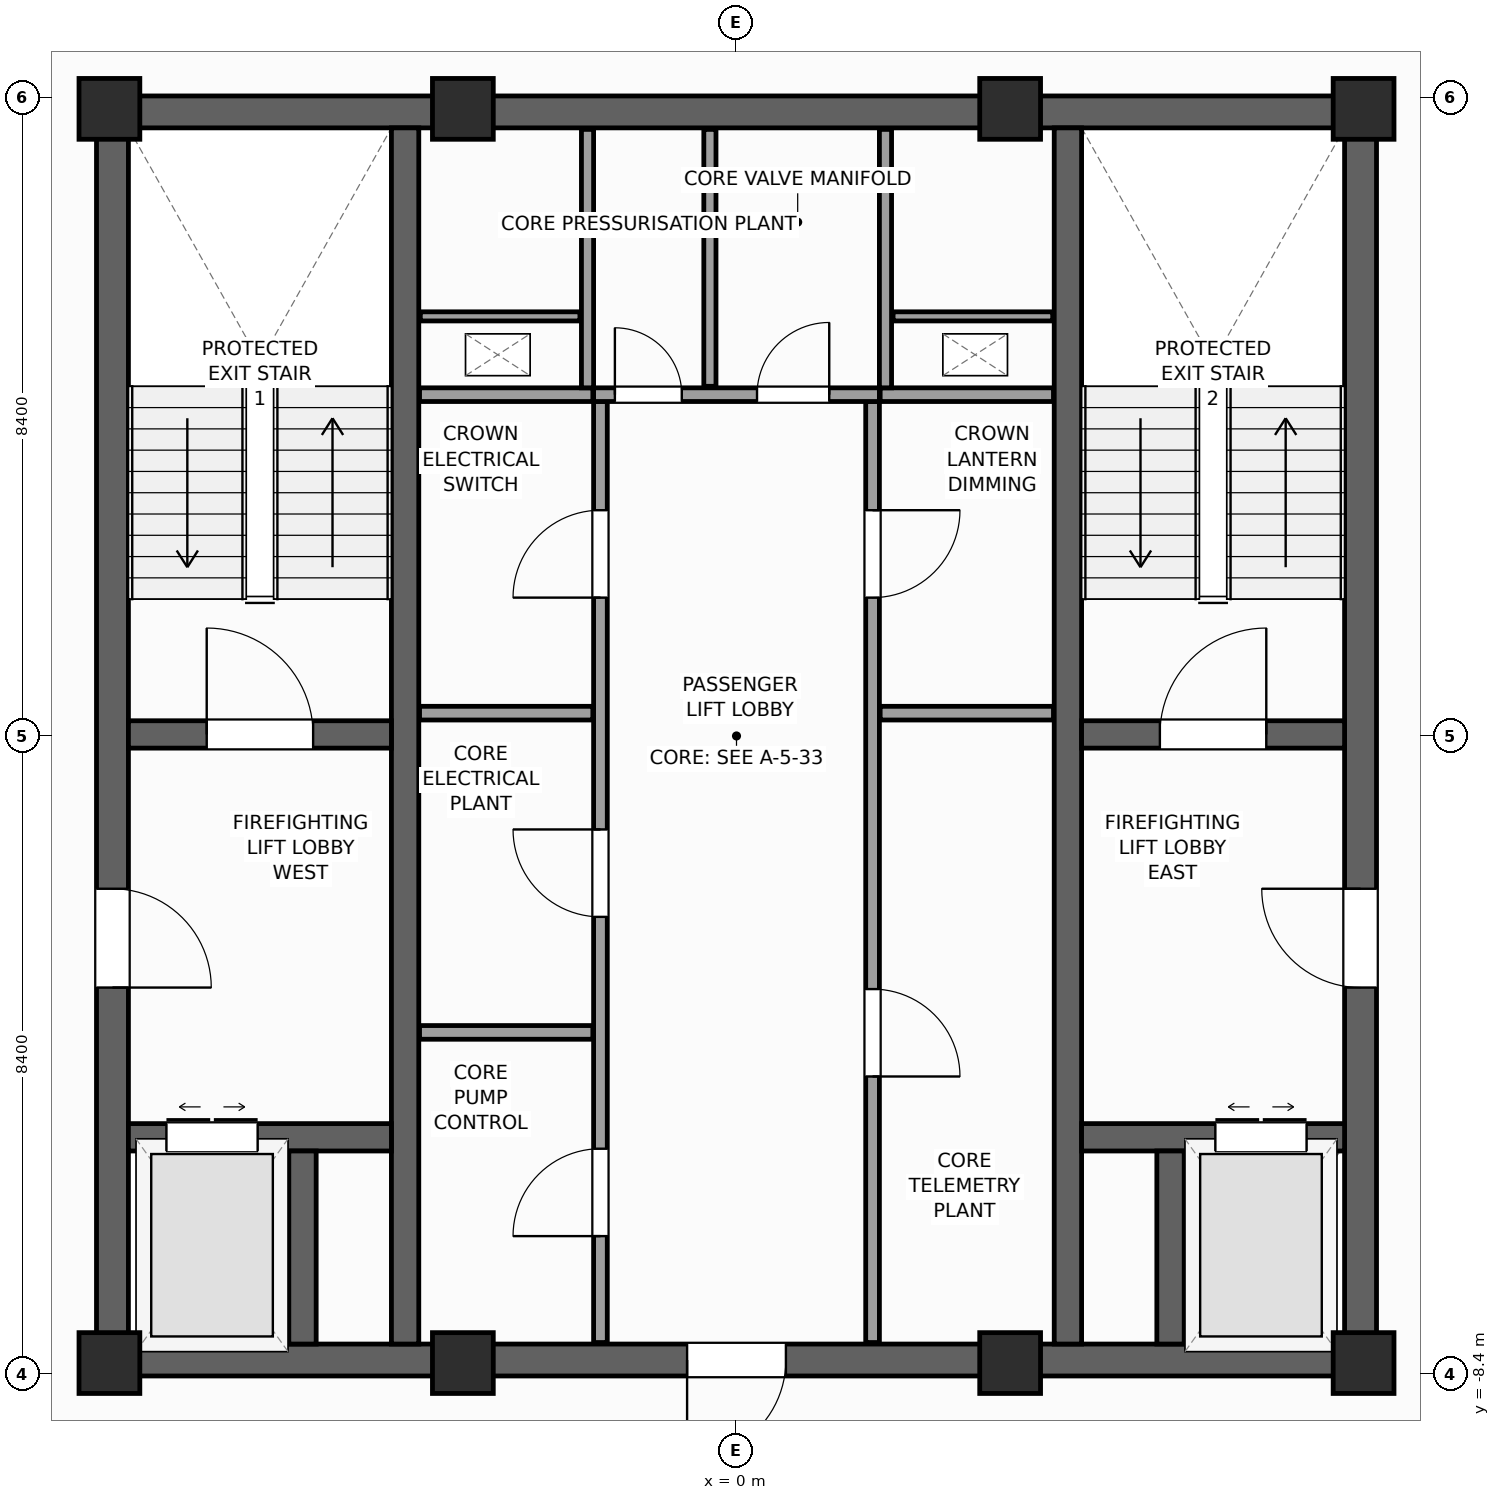
"""IFC4 building model, lengths in metres.
Left out: names, types, materials, properties, quantities, classifications, styles, units other than length and angle.
Written with IfcOpenShell. Run it as: python <this file> out.ifc"""

import sys

from ifc_helpers import new_model, si_unit, direction, frame, frame_2d, origin, origin_2d, place, context, subcontext, project, spatial, rectangle, extrude, source, transform, mapped, element, fill, save


model = new_model("IFC4")
c1 = context("Model", 3, precision=1e-05, world=origin(), true_north=direction((0.0, 1.0)))
c2 = subcontext(c1, "Body", "Model", "MODEL_VIEW")
j1 = project(units=[si_unit("LENGTHUNIT", "METRE"), si_unit("PLANEANGLEUNIT", "RADIAN")], contexts=[c1])
p1 = place(None, origin())
s1 = spatial("IfcSite", under=j1, at=p1, CompositionType="ELEMENT")
p2 = place(p1, origin())
s2 = spatial("IfcBuilding", under=s1, at=p2, CompositionType="ELEMENT")
p3 = place(p2, frame((0.0, 0.0, 337.6)))
s3 = spatial("IfcBuildingStorey", under=s2, at=p3, CompositionType="ELEMENT", Elevation=337.6)
p4 = place(p3, frame((-8.42, -8.21, 0.0), z_axis=(0.0, 0.0, 1.0), x_axis=(1.0, 0.0, 0.0)))
e1 = element("IfcWall", 1, at=p4, inside=s3, PredefinedType="SHEAR", context=c2, shape_type="SweptSolid", body=[
    extrude(rectangle(XDim=16.84, YDim=0.42, at=frame_2d((8.42, 0.0))), origin(), (0.0, 0.0, 1.0), 4.0),
])
p5 = place(p4, frame((7.77, 0.0, 0.0)))
e2 = element("IfcOpeningElement", 2, at=p5, cuts=e1, PredefinedType="OPENING", context=c2, shape_type="SweptSolid", body=[
    extrude(rectangle(XDim=1.3, YDim=2.2, at=frame_2d((0.65, 1.1))), frame((0.0, 0.22, 0.0), z_axis=(0.0, -1.0, 0.0), x_axis=(1.0, 0.0, 0.0)), (0.0, 0.0, 1.0), 0.44),
])
p6 = place(p3, frame((-8.42, 8.21, 0.0), z_axis=(0.0, 0.0, 1.0), x_axis=(1.0, 0.0, 0.0)))
e3 = element("IfcWall", 3, at=p6, inside=s3, PredefinedType="SHEAR", context=c2, shape_type="SweptSolid", body=[
    extrude(rectangle(XDim=16.84, YDim=0.42, at=frame_2d((8.42, 0.0))), origin(), (0.0, 0.0, 1.0), 4.0),
])
p7 = place(p3, frame((-8.21, -8.0, 0.0), z_axis=(0.0, 0.0, 1.0), x_axis=(0.0, 1.0, 0.0)))
e4 = element("IfcWall", 4, at=p7, inside=s3, PredefinedType="SHEAR", context=c2, shape_type="SweptSolid", body=[
    extrude(rectangle(XDim=16.0, YDim=0.42, at=frame_2d((8.0, 0.0))), origin(), (0.0, 0.0, 1.0), 4.0),
])
p8 = place(p7, frame((4.69, 0.0, 0.0)))
e5 = element("IfcOpeningElement", 5, at=p8, cuts=e4, PredefinedType="OPENING", context=c2, shape_type="SweptSolid", body=[
    extrude(rectangle(XDim=1.3, YDim=2.2, at=frame_2d((0.65, 1.1))), frame((0.0, 0.22, 0.0), z_axis=(0.0, -1.0, 0.0), x_axis=(1.0, 0.0, 0.0)), (0.0, 0.0, 1.0), 0.44),
])
p9 = place(p3, frame((8.21, -8.0, 0.0), z_axis=(0.0, 0.0, 1.0), x_axis=(0.0, 1.0, 0.0)))
e6 = element("IfcWall", 6, at=p9, inside=s3, PredefinedType="SHEAR", context=c2, shape_type="SweptSolid", body=[
    extrude(rectangle(XDim=16.0, YDim=0.42, at=frame_2d((8.0, 0.0))), origin(), (0.0, 0.0, 1.0), 4.0),
])
p10 = place(p9, frame((4.69, 0.0, 0.0)))
e7 = element("IfcOpeningElement", 7, at=p10, cuts=e6, PredefinedType="OPENING", context=c2, shape_type="SweptSolid", body=[
    extrude(rectangle(XDim=1.3, YDim=2.2, at=frame_2d((0.65, 1.1))), frame((0.0, 0.22, 0.0), z_axis=(0.0, -1.0, 0.0), x_axis=(1.0, 0.0, 0.0)), (0.0, 0.0, 1.0), 0.44),
])
for number, where, z_axis, x_axis in (
    (8, (-4.36, -8.0, 0.0), (0.0, 0.0, 1.0), (0.0, 1.0, 0.0)),
    (9, (4.36, -8.0, 0.0), (0.0, 0.0, 1.0), (0.0, 1.0, 0.0)),
):
    element("IfcWall", number, at=place(p3, frame(where, z_axis=z_axis, x_axis=x_axis)), inside=s3, PredefinedType="SHEAR", context=c2, shape_type="SweptSolid", body=[
        extrude(rectangle(XDim=16.0, YDim=0.36, at=frame_2d((8.0, 0.0))), origin(), (0.0, 0.0, 1.0), 4.0),
    ])
p11 = place(p3, frame((-8.0, 0.02, 0.0), z_axis=(0.0, 0.0, 1.0), x_axis=(1.0, 0.0, 0.0)))
e10 = element("IfcWall", 10, at=p11, inside=s3, PredefinedType="SHEAR", context=c2, shape_type="SweptSolid", body=[
    extrude(rectangle(XDim=3.46, YDim=0.36, at=frame_2d((1.73, 0.0))), origin(), (0.0, 0.0, 1.0), 4.0),
])
p12 = place(p11, frame((1.03, 0.0, 0.0)))
e11 = element("IfcOpeningElement", 11, at=p12, cuts=e10, PredefinedType="OPENING", context=c2, shape_type="SweptSolid", body=[
    extrude(rectangle(XDim=1.4, YDim=2.2, at=frame_2d((0.7, 1.1))), frame((0.0, 0.19, 0.0), z_axis=(0.0, -1.0, 0.0), x_axis=(1.0, 0.0, 0.0)), (0.0, 0.0, 1.0), 0.38),
])
p13 = place(p3, frame((4.54, 0.02, 0.0), z_axis=(0.0, 0.0, 1.0), x_axis=(1.0, 0.0, 0.0)))
e12 = element("IfcWall", 12, at=p13, inside=s3, PredefinedType="SHEAR", context=c2, shape_type="SweptSolid", body=[
    extrude(rectangle(XDim=3.46, YDim=0.36, at=frame_2d((1.73, 0.0))), origin(), (0.0, 0.0, 1.0), 4.0),
])
p14 = place(p13, frame((1.03, 0.0, 0.0)))
e13 = element("IfcOpeningElement", 13, at=p14, cuts=e12, PredefinedType="OPENING", context=c2, shape_type="SweptSolid", body=[
    extrude(rectangle(XDim=1.4, YDim=2.2, at=frame_2d((0.7, 1.1))), frame((0.0, 0.19, 0.0), z_axis=(0.0, -1.0, 0.0), x_axis=(1.0, 0.0, 0.0)), (0.0, 0.0, 1.0), 0.38),
])
p15 = place(p3, frame((-8.0, -5.28, 0.0), z_axis=(0.0, 0.0, 1.0), x_axis=(1.0, 0.0, 0.0)))
e14 = element("IfcWall", 14, at=p15, inside=s3, PredefinedType="SHEAR", context=c2, shape_type="SweptSolid", body=[
    extrude(rectangle(XDim=3.46, YDim=0.36, at=frame_2d((1.73, 0.0))), origin(), (0.0, 0.0, 1.0), 4.0),
])
p16 = place(p15, frame((0.5, 0.0, 0.0)))
e15 = element("IfcOpeningElement", 15, at=p16, cuts=e14, PredefinedType="OPENING", context=c2, shape_type="SweptSolid", body=[
    extrude(rectangle(XDim=1.2, YDim=2.25, at=frame_2d((0.6, 1.125))), frame((0.0, 0.19, 0.0), z_axis=(0.0, -1.0, 0.0), x_axis=(1.0, 0.0, 0.0)), (0.0, 0.0, 1.0), 0.38),
])
p17 = place(p3, frame((4.54, -5.28, 0.0), z_axis=(0.0, 0.0, 1.0), x_axis=(1.0, 0.0, 0.0)))
e16 = element("IfcWall", 16, at=p17, inside=s3, PredefinedType="SHEAR", context=c2, shape_type="SweptSolid", body=[
    extrude(rectangle(XDim=3.46, YDim=0.36, at=frame_2d((1.73, 0.0))), origin(), (0.0, 0.0, 1.0), 4.0),
])
p18 = place(p17, frame((1.76, 0.0, 0.0)))
e17 = element("IfcOpeningElement", 17, at=p18, cuts=e16, PredefinedType="OPENING", context=c2, shape_type="SweptSolid", body=[
    extrude(rectangle(XDim=1.2, YDim=2.25, at=frame_2d((0.6, 1.125))), frame((0.0, 0.19, 0.0), z_axis=(0.0, -1.0, 0.0), x_axis=(1.0, 0.0, 0.0)), (0.0, 0.0, 1.0), 0.38),
])
for number, where, z_axis, x_axis in (
    (18, (-5.71, -8.0, 0.0), (0.0, 0.0, 1.0), (0.0, 1.0, 0.0)),
    (19, (5.71, -8.0, 0.0), (0.0, 0.0, 1.0), (0.0, 1.0, 0.0)),
):
    element("IfcWall", number, at=place(p3, frame(where, z_axis=z_axis, x_axis=x_axis)), inside=s3, PredefinedType="SHEAR", context=c2, shape_type="SweptSolid", body=[
        extrude(rectangle(XDim=2.54, YDim=0.36, at=frame_2d((1.27, 0.0))), origin(), (0.0, 0.0, 1.0), 4.0),
    ])
m1 = source(origin(), c2, "Body", "SweptSolid", [
    extrude(rectangle(XDim=0.8, YDim=0.8, at=origin_2d()), origin(), (0.0, 0.0, 1.0), 4.0),
])
for number, where, z_axis, x_axis in (
    (20, (-8.25, -8.25, 0.0), (0.0, 0.0, 1.0), (1.0, 0.0, 0.0)),
    (21, (8.25, -8.25, 0.0), (0.0, 0.0, 1.0), (1.0, 0.0, 0.0)),
    (22, (8.25, 8.25, 0.0), (0.0, 0.0, 1.0), (1.0, 0.0, 0.0)),
    (23, (-8.25, 8.25, 0.0), (0.0, 0.0, 1.0), (1.0, 0.0, 0.0)),
    (24, (-3.6, -8.25, 0.0), (0.0, 0.0, 1.0), (1.0, 0.0, 0.0)),
    (25, (3.6, -8.25, 0.0), (0.0, 0.0, 1.0), (1.0, 0.0, 0.0)),
    (26, (-3.6, 8.25, 0.0), (0.0, 0.0, 1.0), (1.0, 0.0, 0.0)),
    (27, (3.6, 8.25, 0.0), (0.0, 0.0, 1.0), (1.0, 0.0, 0.0)),
):
    element("IfcColumn", number, at=place(p3, frame(where, z_axis=z_axis, x_axis=x_axis)), inside=s3, PredefinedType="PILASTER", context=c2, shape_type="MappedRepresentation", body=[
        mapped(m1, transform((0.0, 0.0, 0.0), scale=1.0)),
    ])
p19 = place(p3, frame((-1.79, -7.98, 0.0), z_axis=(0.0, 0.0, 1.0), x_axis=(0.0, 1.0, 0.0)))
e28 = element("IfcWall", 28, at=p19, inside=s3, PredefinedType="PARTITIONING", context=c2, shape_type="SweptSolid", body=[
    extrude(rectangle(XDim=12.38, YDim=0.18, at=frame_2d((6.19, 0.0))), origin(), (0.0, 0.0, 1.0), 3.7),
])
p20 = place(p19, frame((1.4, 0.0, 0.0)))
e29 = element("IfcOpeningElement", 29, at=p20, cuts=e28, PredefinedType="OPENING", context=c2, shape_type="SweptSolid", body=[
    extrude(rectangle(XDim=1.15, YDim=2.25, at=frame_2d((0.575, 1.125))), frame((0.0, 0.1, 0.0), z_axis=(0.0, -1.0, 0.0), x_axis=(1.0, 0.0, 0.0)), (0.0, 0.0, 1.0), 0.2),
])
p21 = place(p19, frame((5.6, 0.0, 0.0)))
e30 = element("IfcOpeningElement", 30, at=p21, cuts=e28, PredefinedType="OPENING", context=c2, shape_type="SweptSolid", body=[
    extrude(rectangle(XDim=1.15, YDim=2.25, at=frame_2d((0.575, 1.125))), frame((0.0, 0.1, 0.0), z_axis=(0.0, -1.0, 0.0), x_axis=(1.0, 0.0, 0.0)), (0.0, 0.0, 1.0), 0.2),
])
p22 = place(p19, frame((9.8, 0.0, 0.0)))
e31 = element("IfcOpeningElement", 31, at=p22, cuts=e28, PredefinedType="OPENING", context=c2, shape_type="SweptSolid", body=[
    extrude(rectangle(XDim=1.15, YDim=2.25, at=frame_2d((0.575, 1.125))), frame((0.0, 0.1, 0.0), z_axis=(0.0, -1.0, 0.0), x_axis=(1.0, 0.0, 0.0)), (0.0, 0.0, 1.0), 0.2),
])
p23 = place(p3, frame((1.79, -7.98, 0.0), z_axis=(0.0, 0.0, 1.0), x_axis=(0.0, 1.0, 0.0)))
e32 = element("IfcWall", 32, at=p23, inside=s3, PredefinedType="PARTITIONING", context=c2, shape_type="SweptSolid", body=[
    extrude(rectangle(XDim=12.38, YDim=0.18, at=frame_2d((6.19, 0.0))), origin(), (0.0, 0.0, 1.0), 3.7),
])
p24 = place(p23, frame((3.5, 0.0, 0.0)))
e33 = element("IfcOpeningElement", 33, at=p24, cuts=e32, PredefinedType="OPENING", context=c2, shape_type="SweptSolid", body=[
    extrude(rectangle(XDim=1.15, YDim=2.25, at=frame_2d((0.575, 1.125))), frame((0.0, 0.1, 0.0), z_axis=(0.0, -1.0, 0.0), x_axis=(1.0, 0.0, 0.0)), (0.0, 0.0, 1.0), 0.2),
])
p25 = place(p23, frame((9.8, 0.0, 0.0)))
e34 = element("IfcOpeningElement", 34, at=p25, cuts=e32, PredefinedType="OPENING", context=c2, shape_type="SweptSolid", body=[
    extrude(rectangle(XDim=1.15, YDim=2.25, at=frame_2d((0.575, 1.125))), frame((0.0, 0.1, 0.0), z_axis=(0.0, -1.0, 0.0), x_axis=(1.0, 0.0, 0.0)), (0.0, 0.0, 1.0), 0.2),
])
p26 = place(p3, frame((-1.88, 4.49, 0.0), z_axis=(0.0, 0.0, 1.0), x_axis=(1.0, 0.0, 0.0)))
e35 = element("IfcWall", 35, at=p26, inside=s3, PredefinedType="PARTITIONING", context=c2, shape_type="SweptSolid", body=[
    extrude(rectangle(XDim=3.76, YDim=0.18, at=frame_2d((1.88, 0.0))), origin(), (0.0, 0.0, 1.0), 3.7),
])
p27 = place(p26, frame((0.28, 0.0, 0.0)))
e36 = element("IfcOpeningElement", 36, at=p27, cuts=e35, PredefinedType="OPENING", context=c2, shape_type="SweptSolid", body=[
    extrude(rectangle(XDim=0.88, YDim=2.1, at=frame_2d((0.44, 1.05))), frame((0.0, 0.1, 0.0), z_axis=(0.0, -1.0, 0.0), x_axis=(1.0, 0.0, 0.0)), (0.0, 0.0, 1.0), 0.2),
])
p28 = place(p26, frame((2.15, 0.0, 0.0)))
e37 = element("IfcOpeningElement", 37, at=p28, cuts=e35, PredefinedType="OPENING", context=c2, shape_type="SweptSolid", body=[
    extrude(rectangle(XDim=0.95, YDim=2.1, at=frame_2d((0.475, 1.05))), frame((0.0, 0.1, 0.0), z_axis=(0.0, -1.0, 0.0), x_axis=(1.0, 0.0, 0.0)), (0.0, 0.0, 1.0), 0.2),
])
for number, where, z_axis, x_axis in (
    (38, (-4.17, -3.9, 0.0), (0.0, 0.0, 1.0), (1.0, 0.0, 0.0)),
    (39, (-4.17, 0.3, 0.0), (0.0, 0.0, 1.0), (1.0, 0.0, 0.0)),
    (40, (1.89, 0.3, 0.0), (0.0, 0.0, 1.0), (1.0, 0.0, 0.0)),
    (41, (-4.17, 4.49, 0.0), (0.0, 0.0, 1.0), (1.0, 0.0, 0.0)),
    (42, (1.89, 4.49, 0.0), (0.0, 0.0, 1.0), (1.0, 0.0, 0.0)),
):
    element("IfcWall", number, at=place(p3, frame(where, z_axis=z_axis, x_axis=x_axis)), inside=s3, PredefinedType="PARTITIONING", context=c2, shape_type="SweptSolid", body=[
        extrude(rectangle(XDim=2.28, YDim=0.18, at=frame_2d((1.14, 0.0))), origin(), (0.0, 0.0, 1.0), 3.7),
    ])
for number, where, z_axis, x_axis in (
    (43, (-1.96, 4.58, 0.0), (0.0, 0.0, 1.0), (0.0, 1.0, 0.0)),
    (44, (1.96, 4.58, 0.0), (0.0, 0.0, 1.0), (0.0, 1.0, 0.0)),
):
    element("IfcWall", number, at=place(p3, frame(where, z_axis=z_axis, x_axis=x_axis)), inside=s3, PredefinedType="PARTITIONING", context=c2, shape_type="SweptSolid", body=[
        extrude(rectangle(XDim=3.4, YDim=0.16, at=frame_2d((1.7, 0.0))), origin(), (0.0, 0.0, 1.0), 3.7),
    ])
for number, where, z_axis, x_axis in (
    (45, (-4.16, 5.52, 0.0), (0.0, 0.0, 1.0), (1.0, 0.0, 0.0)),
    (46, (2.06, 5.52, 0.0), (0.0, 0.0, 1.0), (1.0, 0.0, 0.0)),
):
    element("IfcWall", number, at=place(p3, frame(where, z_axis=z_axis, x_axis=x_axis)), inside=s3, PredefinedType="PARTITIONING", context=c2, shape_type="SweptSolid", body=[
        extrude(rectangle(XDim=2.1, YDim=0.12, at=frame_2d((1.05, 0.0))), origin(), (0.0, 0.0, 1.0), 3.7),
    ])
p29 = place(p3, frame((-0.35, 4.6, 0.0), z_axis=(0.0, 0.0, 1.0), x_axis=(0.0, 1.0, 0.0)))
e47 = element("IfcWall", 47, at=p29, inside=s3, PredefinedType="PARTITIONING", context=c2, shape_type="SweptSolid", body=[
    extrude(rectangle(XDim=3.38, YDim=0.16, at=frame_2d((1.69, 0.0))), origin(), (0.0, 0.0, 1.0), 3.7),
])
m2 = source(origin(), c2, "Body", "SweptSolid", [
    extrude(rectangle(XDim=1.4, YDim=2.2, at=frame_2d((0.7, 1.1))), frame((0.0, 0.025, 0.0), z_axis=(0.0, -1.0, 0.0), x_axis=(1.0, 0.0, 0.0)), (0.0, 0.0, 1.0), 0.05),
])
p30 = place(p12, origin())
e48 = element("IfcDoor", 48, at=p30, inside=s3, OperationType="SINGLE_SWING_LEFT", PredefinedType="DOOR", context=c2, shape_type="MappedRepresentation", body=[
    mapped(m2, transform((0.0, 0.0, 0.0), scale=1.0)),
])
fill(e11, e48)
p31 = place(p14, origin())
e49 = element("IfcDoor", 49, at=p31, inside=s3, OperationType="SINGLE_SWING_RIGHT", PredefinedType="DOOR", context=c2, shape_type="MappedRepresentation", body=[
    mapped(m2, transform((0.0, 0.0, 0.0), scale=1.0)),
])
fill(e13, e49)
m3 = source(origin(), c2, "Body", "SweptSolid", [
    extrude(rectangle(XDim=1.3, YDim=2.2, at=frame_2d((0.65, 1.1))), frame((0.0, 0.025, 0.0), z_axis=(0.0, -1.0, 0.0), x_axis=(1.0, 0.0, 0.0)), (0.0, 0.0, 1.0), 0.05),
])
p32 = place(p8, frame((1.3, 0.0, 0.0), z_axis=(0.0, 0.0, 1.0), x_axis=(-1.0, 0.0, 0.0)))
e50 = element("IfcDoor", 50, at=p32, inside=s3, OperationType="SINGLE_SWING_LEFT", PredefinedType="DOOR", context=c2, shape_type="MappedRepresentation", body=[
    mapped(m3, transform((0.0, 0.0, 0.0), scale=1.0)),
])
fill(e5, e50)
p33 = place(p10, origin())
e51 = element("IfcDoor", 51, at=p33, inside=s3, OperationType="SINGLE_SWING_RIGHT", PredefinedType="DOOR", context=c2, shape_type="MappedRepresentation", body=[
    mapped(m3, transform((0.0, 0.0, 0.0), scale=1.0)),
])
fill(e7, e51)
p34 = place(p5, frame((1.3, 0.0, 0.0), z_axis=(0.0, 0.0, 1.0), x_axis=(-1.0, 0.0, 0.0)))
e52 = element("IfcDoor", 52, at=p34, inside=s3, OperationType="SINGLE_SWING_LEFT", PredefinedType="DOOR", context=c2, shape_type="MappedRepresentation", body=[
    mapped(m3, transform((0.0, 0.0, 0.0), scale=1.0)),
])
fill(e2, e52)
m4 = source(origin(), c2, "Body", "SweptSolid", [
    extrude(rectangle(XDim=1.2, YDim=2.25, at=frame_2d((0.6, 1.125))), frame((0.0, 0.025, 0.0), z_axis=(0.0, -1.0, 0.0), x_axis=(1.0, 0.0, 0.0)), (0.0, 0.0, 1.0), 0.05),
])
p35 = place(p16, origin())
e53 = element("IfcDoor", 53, at=p35, inside=s3, OperationType="DOUBLE_DOOR_SLIDING", PredefinedType="DOOR", context=c2, shape_type="MappedRepresentation", body=[
    mapped(m4, transform((0.0, 0.0, 0.0), scale=1.0)),
])
fill(e15, e53)
p36 = place(p18, origin())
e54 = element("IfcDoor", 54, at=p36, inside=s3, OperationType="DOUBLE_DOOR_SLIDING", PredefinedType="DOOR", context=c2, shape_type="MappedRepresentation", body=[
    mapped(m4, transform((0.0, 0.0, 0.0), scale=1.0)),
])
fill(e17, e54)
m5 = source(origin(), c2, "Body", "SweptSolid", [
    extrude(rectangle(XDim=1.15, YDim=2.25, at=frame_2d((0.575, 1.125))), frame((0.0, 0.025, 0.0), z_axis=(0.0, -1.0, 0.0), x_axis=(1.0, 0.0, 0.0)), (0.0, 0.0, 1.0), 0.05),
])
p37 = place(p20, origin())
e55 = element("IfcDoor", 55, at=p37, inside=s3, OperationType="SINGLE_SWING_LEFT", PredefinedType="DOOR", context=c2, shape_type="MappedRepresentation", body=[
    mapped(m5, transform((0.0, 0.0, 0.0), scale=1.0)),
])
fill(e29, e55)
p38 = place(p21, origin())
e56 = element("IfcDoor", 56, at=p38, inside=s3, OperationType="SINGLE_SWING_RIGHT", PredefinedType="DOOR", context=c2, shape_type="MappedRepresentation", body=[
    mapped(m5, transform((0.0, 0.0, 0.0), scale=1.0)),
])
fill(e30, e56)
p39 = place(p24, frame((1.15, 0.0, 0.0), z_axis=(0.0, 0.0, 1.0), x_axis=(-1.0, 0.0, 0.0)))
e57 = element("IfcDoor", 57, at=p39, inside=s3, OperationType="SINGLE_SWING_LEFT", PredefinedType="DOOR", context=c2, shape_type="MappedRepresentation", body=[
    mapped(m5, transform((0.0, 0.0, 0.0), scale=1.0)),
])
fill(e33, e57)
p40 = place(p22, origin())
e58 = element("IfcDoor", 58, at=p40, inside=s3, OperationType="SINGLE_SWING_LEFT", PredefinedType="DOOR", context=c2, shape_type="MappedRepresentation", body=[
    mapped(m5, transform((0.0, 0.0, 0.0), scale=1.0)),
])
fill(e31, e58)
p41 = place(p25, frame((1.15, 0.0, 0.0), z_axis=(0.0, 0.0, 1.0), x_axis=(-1.0, 0.0, 0.0)))
e59 = element("IfcDoor", 59, at=p41, inside=s3, OperationType="SINGLE_SWING_RIGHT", PredefinedType="DOOR", context=c2, shape_type="MappedRepresentation", body=[
    mapped(m5, transform((0.0, 0.0, 0.0), scale=1.0)),
])
fill(e34, e59)
m6 = source(origin(), c2, "Body", "SweptSolid", [
    extrude(rectangle(XDim=0.88, YDim=2.1, at=frame_2d((0.44, 1.05))), frame((0.0, 0.025, 0.0), z_axis=(0.0, -1.0, 0.0), x_axis=(1.0, 0.0, 0.0)), (0.0, 0.0, 1.0), 0.05),
])
p42 = place(p27, origin())
e60 = element("IfcDoor", 60, at=p42, inside=s3, OperationType="SINGLE_SWING_LEFT", PredefinedType="DOOR", context=c2, shape_type="MappedRepresentation", body=[
    mapped(m6, transform((0.0, 0.0, 0.0), scale=1.0)),
])
fill(e36, e60)
m7 = source(origin(), c2, "Body", "SweptSolid", [
    extrude(rectangle(XDim=0.95, YDim=2.1, at=frame_2d((0.475, 1.05))), frame((0.0, 0.025, 0.0), z_axis=(0.0, -1.0, 0.0), x_axis=(1.0, 0.0, 0.0)), (0.0, 0.0, 1.0), 0.05),
])
p43 = place(p28, origin())
e61 = element("IfcDoor", 61, at=p43, inside=s3, OperationType="SINGLE_SWING_RIGHT", PredefinedType="DOOR", context=c2, shape_type="MappedRepresentation", body=[
    mapped(m7, transform((0.0, 0.0, 0.0), scale=1.0)),
])
fill(e37, e61)
save(model, sys.argv[1])
